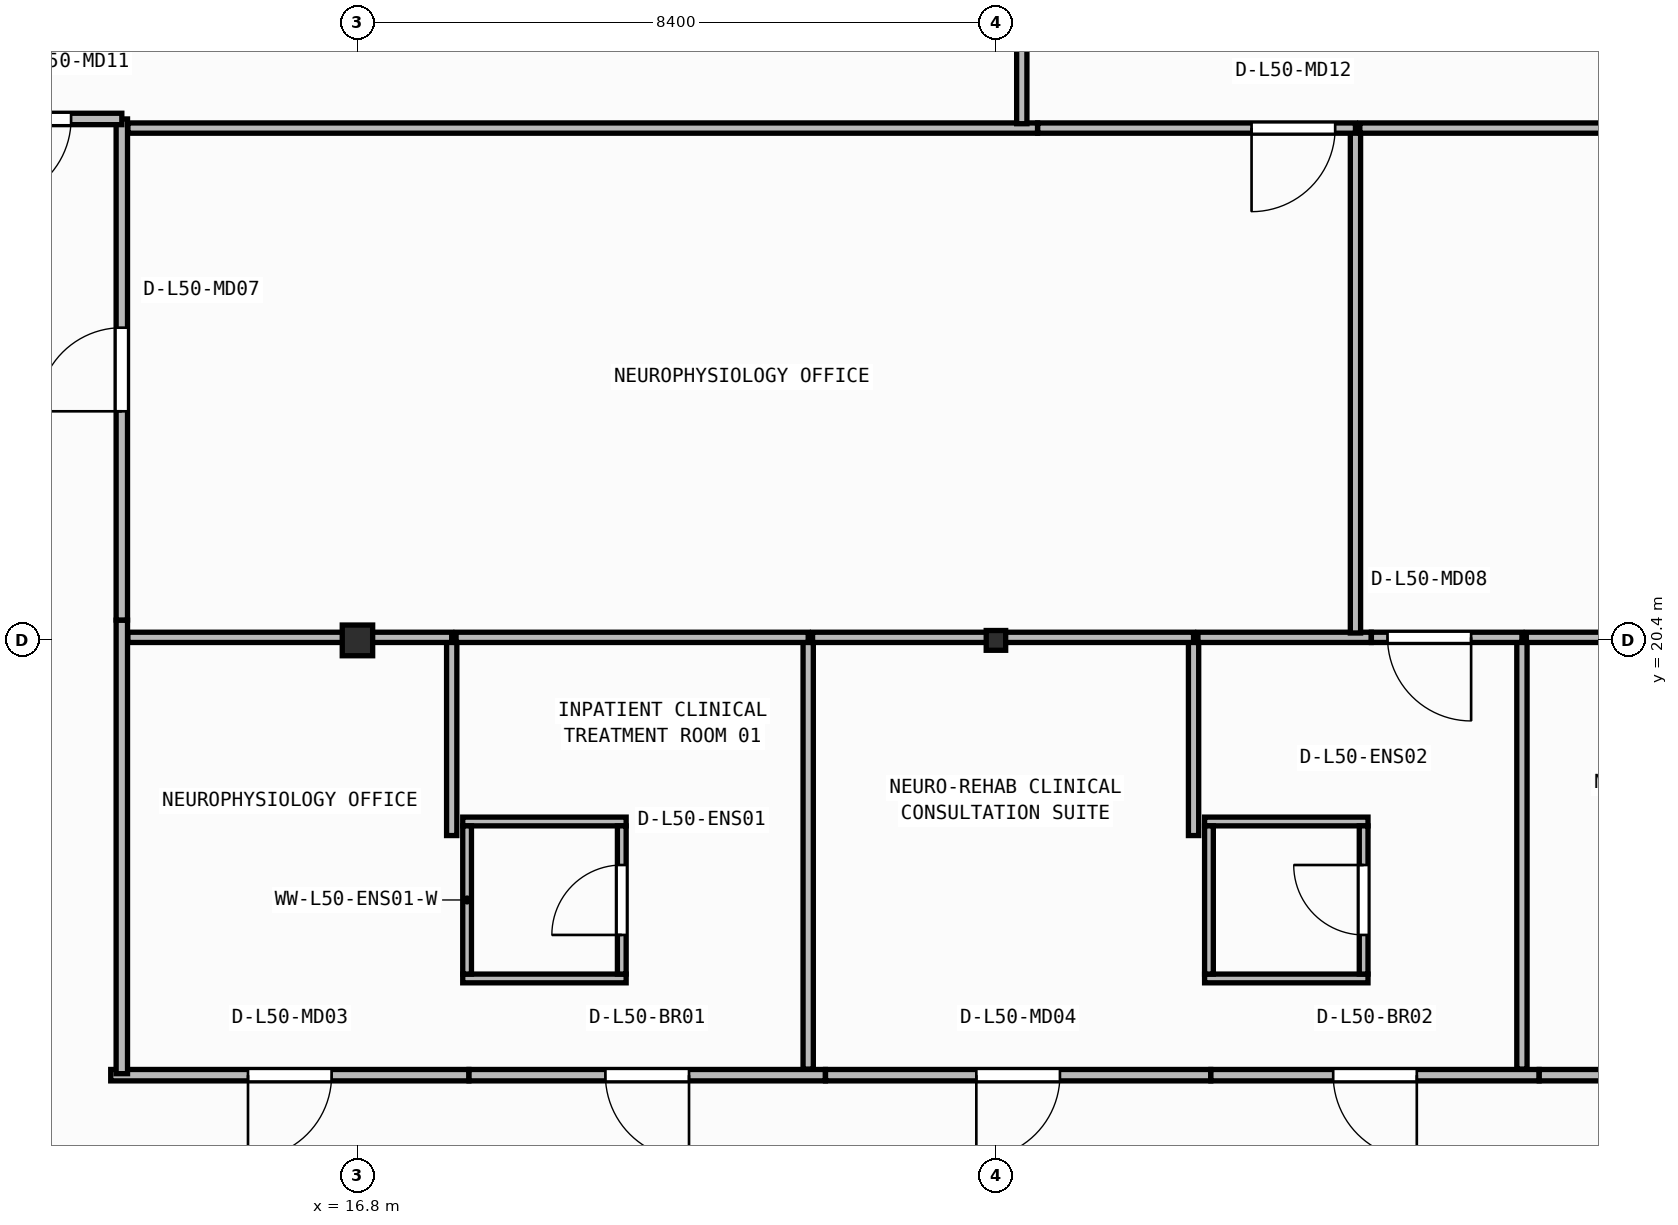
"""IFC4 building model, lengths in metres.
Left out: names, types, materials, properties, quantities, classifications, styles, units other than length and angle.
Written with IfcOpenShell. Run it as: python <this file> out.ifc"""

import sys

from ifc_helpers import new_model, si_unit, direction, frame, frame_2d, origin, origin_2d, place, context, subcontext, project, spatial, rectangle, i_section, extrude, element, fill, save


model = new_model("IFC4")
c1 = context("Model", 3, precision=1e-05, world=origin(), true_north=direction((0.0, 1.0)))
c2 = subcontext(c1, "Body", "Model", "MODEL_VIEW")
j1 = project(units=[si_unit("LENGTHUNIT", "METRE"), si_unit("PLANEANGLEUNIT", "RADIAN")], contexts=[c1])
p1 = place(None, origin())
s1 = spatial("IfcSite", under=j1, at=p1, CompositionType="ELEMENT")
p2 = place(p1, origin())
s2 = spatial("IfcBuilding", under=s1, at=p2, CompositionType="ELEMENT")
p3 = place(p2, frame((0.0, 0.0, 203.95)))
s3 = spatial("IfcBuildingStorey", under=s2, at=p3, CompositionType="ELEMENT", Elevation=203.95)
p4 = place(p3, frame((16.8, 20.4, 0.0), z_axis=(0.0, 0.0, 1.0), x_axis=(1.0, 0.0, 0.0)))
e1 = element("IfcColumn", 1, at=p4, inside=s3, PredefinedType="COLUMN", context=c2, shape_type="SweptSolid", body=[
    extrude(i_section(OverallWidth=0.4, OverallDepth=0.404, WebThickness=0.02, FlangeThickness=0.032, at=origin_2d()), origin(), (0.0, 0.0, 1.0), 3.95),
])
p5 = place(p3, frame((25.2, 20.4, 0.0), z_axis=(0.0, 0.0, 1.0), x_axis=(1.0, 0.0, 0.0)))
e2 = element("IfcColumn", 2, at=p5, inside=s3, PredefinedType="COLUMN", context=c2, shape_type="SweptSolid", body=[
    extrude(i_section(OverallWidth=0.256, OverallDepth=0.26, WebThickness=0.01, FlangeThickness=0.017, FilletRadius=0.013, at=origin_2d()), origin(), (0.0, 0.0, 1.0), 3.95),
])
for number, where, z_axis, x_axis in (
    (3, (18.185, 15.952, 0.0), (0.0, 0.0, 1.0), (1.0, 0.0, 0.0)),
    (4, (18.185, 18.018, 0.0), (0.0, 0.0, 1.0), (1.0, 0.0, 0.0)),
):
    element("IfcWall", number, at=place(p3, frame(where, z_axis=z_axis, x_axis=x_axis)), inside=s3, PredefinedType="PARTITIONING", context=c2, shape_type="SweptSolid", body=[
        extrude(rectangle(XDim=2.15, YDim=0.115, at=frame_2d((1.075, 0.0))), origin(), (0.0, 0.0, 1.0), 3.71),
    ])
p6 = place(p3, frame((18.242, 16.01, 0.0), z_axis=(0.0, 0.0, 1.0), x_axis=(0.0, 1.0, 0.0)))
e5 = element("IfcWall", 5, at=p6, inside=s3, PredefinedType="PARTITIONING", context=c2, shape_type="SweptSolid", body=[
    extrude(rectangle(XDim=1.95, YDim=0.115, at=frame_2d((0.975, 0.0))), origin(), (0.0, 0.0, 1.0), 3.71),
])
p7 = place(p3, frame((20.278, 16.01, 0.0), z_axis=(0.0, 0.0, 1.0), x_axis=(0.0, 1.0, 0.0)))
e6 = element("IfcWall", 6, at=p7, inside=s3, PredefinedType="PARTITIONING", context=c2, shape_type="SweptSolid", body=[
    extrude(rectangle(XDim=1.95, YDim=0.115, at=frame_2d((0.975, 0.0))), origin(), (0.0, 0.0, 1.0), 3.71),
])
p8 = place(p7, frame((0.515, 0.0, 0.0)))
e7 = element("IfcOpeningElement", 7, at=p8, cuts=e6, PredefinedType="OPENING", context=c2, shape_type="SweptSolid", body=[
    extrude(rectangle(XDim=0.92, YDim=2.1, at=frame_2d((0.46, 1.05))), frame((0.0, 0.067, 0.0), z_axis=(0.0, -1.0, 0.0), x_axis=(1.0, 0.0, 0.0)), (0.0, 0.0, 1.0), 0.135),
])
p9 = place(p3, frame((27.945, 15.952, 0.0), z_axis=(0.0, 0.0, 1.0), x_axis=(1.0, 0.0, 0.0)))
e8 = element("IfcWall", 8, at=p9, inside=s3, PredefinedType="PARTITIONING", context=c2, shape_type="SweptSolid", body=[
    extrude(rectangle(XDim=2.15, YDim=0.115, at=frame_2d((1.075, 0.0))), origin(), (0.0, 0.0, 1.0), 3.381),
])
p10 = place(p3, frame((27.945, 18.018, 0.0), z_axis=(0.0, 0.0, 1.0), x_axis=(1.0, 0.0, 0.0)))
e9 = element("IfcWall", 9, at=p10, inside=s3, PredefinedType="PARTITIONING", context=c2, shape_type="SweptSolid", body=[
    extrude(rectangle(XDim=2.15, YDim=0.115, at=frame_2d((1.075, 0.0))), origin(), (0.0, 0.0, 1.0), 3.71),
])
p11 = place(p3, frame((28.002, 16.01, 0.0), z_axis=(0.0, 0.0, 1.0), x_axis=(0.0, 1.0, 0.0)))
e10 = element("IfcWall", 10, at=p11, inside=s3, PredefinedType="PARTITIONING", context=c2, shape_type="SweptSolid", body=[
    extrude(rectangle(XDim=1.95, YDim=0.115, at=frame_2d((0.975, 0.0))), origin(), (0.0, 0.0, 1.0), 3.71),
])
p12 = place(p3, frame((30.038, 16.01, 0.0), z_axis=(0.0, 0.0, 1.0), x_axis=(0.0, 1.0, 0.0)))
e11 = element("IfcWall", 11, at=p12, inside=s3, PredefinedType="PARTITIONING", context=c2, shape_type="SweptSolid", body=[
    extrude(rectangle(XDim=1.95, YDim=0.115, at=frame_2d((0.975, 0.0))), origin(), (0.0, 0.0, 1.0), 3.71),
])
p13 = place(p12, frame((0.515, 0.0, 0.0)))
e12 = element("IfcOpeningElement", 12, at=p13, cuts=e11, PredefinedType="OPENING", context=c2, shape_type="SweptSolid", body=[
    extrude(rectangle(XDim=0.92, YDim=2.1, at=frame_2d((0.46, 1.05))), frame((0.0, 0.067, 0.0), z_axis=(0.0, -1.0, 0.0), x_axis=(1.0, 0.0, 0.0)), (0.0, 0.0, 1.0), 0.135),
])
p14 = place(p3, frame((18.266, 14.68, 0.0), z_axis=(0.0, 0.0, 1.0), x_axis=(-1.0, 0.0, 0.0)))
e13 = element("IfcWall", 13, at=p14, inside=s3, PredefinedType="PARTITIONING", context=c2, shape_type="SweptSolid", body=[
    extrude(rectangle(XDim=4.712, YDim=0.15, at=frame_2d((2.356, 0.0))), origin(), (0.0, 0.0, 1.0), 3.71),
])
p15 = place(p14, frame((1.806, 0.0, 0.0)))
e14 = element("IfcOpeningElement", 14, at=p15, cuts=e13, PredefinedType="OPENING", context=c2, shape_type="SweptSolid", body=[
    extrude(rectangle(XDim=1.1, YDim=2.1, at=frame_2d((0.55, 1.05))), frame((0.0, 0.085, 0.0), z_axis=(0.0, -1.0, 0.0), x_axis=(1.0, 0.0, 0.0)), (0.0, 0.0, 1.0), 0.17),
])
p16 = place(p3, frame((22.956, 14.68, 0.0), z_axis=(0.0, 0.0, 1.0), x_axis=(-1.0, 0.0, 0.0)))
e15 = element("IfcWall", 15, at=p16, inside=s3, PredefinedType="PARTITIONING", context=c2, shape_type="SweptSolid", body=[
    extrude(rectangle(XDim=4.688, YDim=0.15, at=frame_2d((2.344, 0.0))), origin(), (0.0, 0.0, 1.0), 3.71),
])
p17 = place(p16, frame((1.794, 0.0, 0.0)))
e16 = element("IfcOpeningElement", 16, at=p17, cuts=e15, PredefinedType="OPENING", context=c2, shape_type="SweptSolid", body=[
    extrude(rectangle(XDim=1.1, YDim=2.1, at=frame_2d((0.55, 1.05))), frame((0.0, 0.085, 0.0), z_axis=(0.0, -1.0, 0.0), x_axis=(1.0, 0.0, 0.0)), (0.0, 0.0, 1.0), 0.17),
])
p18 = place(p3, frame((28.026, 14.68, 0.0), z_axis=(0.0, 0.0, 1.0), x_axis=(-1.0, 0.0, 0.0)))
e17 = element("IfcWall", 17, at=p18, inside=s3, PredefinedType="PARTITIONING", context=c2, shape_type="SweptSolid", body=[
    extrude(rectangle(XDim=5.068, YDim=0.15, at=frame_2d((2.534, 0.0))), origin(), (0.0, 0.0, 1.0), 3.71),
])
p19 = place(p18, frame((1.984, 0.0, 0.0)))
e18 = element("IfcOpeningElement", 18, at=p19, cuts=e17, PredefinedType="OPENING", context=c2, shape_type="SweptSolid", body=[
    extrude(rectangle(XDim=1.1, YDim=2.1, at=frame_2d((0.55, 1.05))), frame((0.0, 0.085, 0.0), z_axis=(0.0, -1.0, 0.0), x_axis=(1.0, 0.0, 0.0)), (0.0, 0.0, 1.0), 0.17),
])
p20 = place(p3, frame((32.346, 14.68, 0.0), z_axis=(0.0, 0.0, 1.0), x_axis=(-1.0, 0.0, 0.0)))
e19 = element("IfcWall", 19, at=p20, inside=s3, PredefinedType="PARTITIONING", context=c2, shape_type="SweptSolid", body=[
    extrude(rectangle(XDim=4.318, YDim=0.15, at=frame_2d((2.159, 0.0))), origin(), (0.0, 0.0, 1.0), 3.71),
])
p21 = place(p20, frame((1.609, 0.0, 0.0)))
e20 = element("IfcOpeningElement", 20, at=p21, cuts=e19, PredefinedType="OPENING", context=c2, shape_type="SweptSolid", body=[
    extrude(rectangle(XDim=1.1, YDim=2.1, at=frame_2d((0.55, 1.05))), frame((0.0, 0.085, 0.0), z_axis=(0.0, -1.0, 0.0), x_axis=(1.0, 0.0, 0.0)), (0.0, 0.0, 1.0), 0.17),
])
p22 = place(p3, frame((37.036, 14.68, 0.0), z_axis=(0.0, 0.0, 1.0), x_axis=(-1.0, 0.0, 0.0)))
e21 = element("IfcWall", 21, at=p22, inside=s3, PredefinedType="PARTITIONING", context=c2, shape_type="SweptSolid", body=[
    extrude(rectangle(XDim=4.688, YDim=0.15, at=frame_2d((2.344, 0.0))), origin(), (0.0, 0.0, 1.0), 3.71),
])
p23 = place(p22, frame((1.794, 0.0, 0.0)))
e22 = element("IfcOpeningElement", 22, at=p23, cuts=e21, PredefinedType="OPENING", context=c2, shape_type="SweptSolid", body=[
    extrude(rectangle(XDim=1.1, YDim=2.1, at=frame_2d((0.55, 1.05))), frame((0.0, 0.085, 0.0), z_axis=(0.0, -1.0, 0.0), x_axis=(1.0, 0.0, 0.0)), (0.0, 0.0, 1.0), 0.17),
])
p24 = place(p3, frame((13.7, 14.7, 0.0), z_axis=(0.0, 0.0, 1.0), x_axis=(0.0, 1.0, 0.0)))
e23 = element("IfcWall", 23, at=p24, inside=s3, PredefinedType="PARTITIONING", context=c2, shape_type="SweptSolid", body=[
    extrude(rectangle(XDim=5.966, YDim=0.15, at=frame_2d((2.983, 0.0))), origin(), (0.0, 0.0, 1.0), 3.71),
])
p25 = place(p3, frame((13.7, 20.668, 0.0), z_axis=(0.0, 0.0, 1.0), x_axis=(0.0, 1.0, 0.0)))
e24 = element("IfcWall", 24, at=p25, inside=s3, PredefinedType="PARTITIONING", context=c2, shape_type="SweptSolid", body=[
    extrude(rectangle(XDim=6.592, YDim=0.15, at=frame_2d((3.296, 0.0))), origin(), (0.0, 0.0, 1.0), 3.71),
])
p26 = place(p25, frame((2.746, 0.0, 0.0)))
e25 = element("IfcOpeningElement", 25, at=p26, cuts=e24, PredefinedType="OPENING", context=c2, shape_type="SweptSolid", body=[
    extrude(rectangle(XDim=1.1, YDim=2.1, at=frame_2d((0.55, 1.05))), frame((0.0, 0.085, 0.0), z_axis=(0.0, -1.0, 0.0), x_axis=(1.0, 0.0, 0.0)), (0.0, 0.0, 1.0), 0.17),
])
p27 = place(p3, frame((13.7, 27.26, 0.0), z_axis=(0.0, 0.0, 1.0), x_axis=(-1.0, 0.0, 0.0)))
e26 = element("IfcWall", 26, at=p27, inside=s3, PredefinedType="PARTITIONING", context=c2, shape_type="SweptSolid", body=[
    extrude(rectangle(XDim=2.435, YDim=0.15, at=frame_2d((1.218, 0.0))), origin(), (0.0, 0.0, 1.0), 3.71),
])
p28 = place(p27, frame((0.667, 0.0, 0.0)))
e27 = element("IfcOpeningElement", 27, at=p28, cuts=e26, PredefinedType="OPENING", context=c2, shape_type="SweptSolid", body=[
    extrude(rectangle(XDim=1.1, YDim=2.1, at=frame_2d((0.55, 1.05))), frame((0.0, 0.085, 0.0), z_axis=(0.0, -1.0, 0.0), x_axis=(1.0, 0.0, 0.0)), (0.0, 0.0, 1.0), 0.17),
])
p29 = place(p3, frame((18.04, 17.833, 0.0), z_axis=(0.0, 0.0, 1.0), x_axis=(0.0, 1.0, 0.0)))
e28 = element("IfcWall", 28, at=p29, inside=s3, PredefinedType="PARTITIONING", context=c2, shape_type="SweptSolid", body=[
    extrude(rectangle(XDim=2.607, YDim=0.135, at=frame_2d((1.304, 0.0))), origin(), (0.0, 0.0, 1.0), 3.71),
])
p30 = place(p3, frame((18.04, 20.44, 0.0), z_axis=(0.0, 0.0, 1.0), x_axis=(-1.0, 0.0, 0.0)))
e29 = element("IfcWall", 29, at=p30, inside=s3, PredefinedType="PARTITIONING", context=c2, shape_type="SweptSolid", body=[
    extrude(rectangle(XDim=4.26, YDim=0.135, at=frame_2d((2.13, 0.0))), origin(), (0.0, 0.0, 1.0), 3.152),
])
p31 = place(p3, frame((22.73, 14.76, 0.0), z_axis=(0.0, 0.0, 1.0), x_axis=(0.0, 1.0, 0.0)))
e30 = element("IfcWall", 30, at=p31, inside=s3, PredefinedType="PARTITIONING", context=c2, shape_type="SweptSolid", body=[
    extrude(rectangle(XDim=5.68, YDim=0.135, at=frame_2d((2.84, 0.0))), origin(), (0.0, 0.0, 1.0), 3.71),
])
p32 = place(p3, frame((22.73, 20.44, 0.0), z_axis=(0.0, 0.0, 1.0), x_axis=(-1.0, 0.0, 0.0)))
e31 = element("IfcWall", 31, at=p32, inside=s3, PredefinedType="PARTITIONING", context=c2, shape_type="SweptSolid", body=[
    extrude(rectangle(XDim=4.633, YDim=0.135, at=frame_2d((2.316, 0.0))), origin(), (0.0, 0.0, 1.0), 3.152),
])
p33 = place(p3, frame((27.8, 17.833, 0.0), z_axis=(0.0, 0.0, 1.0), x_axis=(0.0, 1.0, 0.0)))
e32 = element("IfcWall", 32, at=p33, inside=s3, PredefinedType="PARTITIONING", context=c2, shape_type="SweptSolid", body=[
    extrude(rectangle(XDim=2.607, YDim=0.135, at=frame_2d((1.304, 0.0))), origin(), (0.0, 0.0, 1.0), 3.71),
])
p34 = place(p3, frame((27.8, 20.44, 0.0), z_axis=(0.0, 0.0, 1.0), x_axis=(-1.0, 0.0, 0.0)))
e33 = element("IfcWall", 33, at=p34, inside=s3, PredefinedType="PARTITIONING", context=c2, shape_type="SweptSolid", body=[
    extrude(rectangle(XDim=5.012, YDim=0.135, at=frame_2d((2.506, 0.0))), origin(), (0.0, 0.0, 1.0), 3.152),
])
p35 = place(p3, frame((32.12, 14.76, 0.0), z_axis=(0.0, 0.0, 1.0), x_axis=(0.0, 1.0, 0.0)))
e34 = element("IfcWall", 34, at=p35, inside=s3, PredefinedType="PARTITIONING", context=c2, shape_type="SweptSolid", body=[
    extrude(rectangle(XDim=5.68, YDim=0.135, at=frame_2d((2.84, 0.0))), origin(), (0.0, 0.0, 1.0), 3.71),
])
p36 = place(p3, frame((30.137, 20.44, 0.0), z_axis=(0.0, 0.0, 1.0), x_axis=(-1.0, 0.0, 0.0)))
e35 = element("IfcWall", 35, at=p36, inside=s3, PredefinedType="PARTITIONING", context=c2, shape_type="SweptSolid", body=[
    extrude(rectangle(XDim=2.28, YDim=0.135, at=frame_2d((1.14, 0.0))), origin(), (0.0, 0.0, 1.0), 3.152),
])
p37 = place(p3, frame((32.12, 20.44, 0.0), z_axis=(0.0, 0.0, 1.0), x_axis=(-1.0, 0.0, 0.0)))
e36 = element("IfcWall", 36, at=p37, inside=s3, PredefinedType="PARTITIONING", context=c2, shape_type="SweptSolid", body=[
    extrude(rectangle(XDim=1.981, YDim=0.135, at=frame_2d((0.99, 0.0))), origin(), (0.0, 0.0, 1.0), 3.152),
])
p38 = place(p37, frame((0.668, 0.0, 0.0)))
e37 = element("IfcOpeningElement", 37, at=p38, cuts=e36, PredefinedType="OPENING", context=c2, shape_type="SweptSolid", body=[
    extrude(rectangle(XDim=1.1, YDim=2.1, at=frame_2d((0.55, 1.05))), frame((0.0, 0.077, 0.0), z_axis=(0.0, -1.0, 0.0), x_axis=(1.0, 0.0, 0.0)), (0.0, 0.0, 1.0), 0.155),
])
p39 = place(p3, frame((36.81, 20.44, 0.0), z_axis=(0.0, 0.0, 1.0), x_axis=(-1.0, 0.0, 0.0)))
e38 = element("IfcWall", 38, at=p39, inside=s3, PredefinedType="PARTITIONING", context=c2, shape_type="SweptSolid", body=[
    extrude(rectangle(XDim=4.633, YDim=0.135, at=frame_2d((2.316, 0.0))), origin(), (0.0, 0.0, 1.0), 3.152),
])
p40 = place(p3, frame((29.93, 20.498, 0.0), z_axis=(0.0, 0.0, 1.0), x_axis=(0.0, 1.0, 0.0)))
e39 = element("IfcWall", 39, at=p40, inside=s3, PredefinedType="PARTITIONING", context=c2, shape_type="SweptSolid", body=[
    extrude(rectangle(XDim=6.642, YDim=0.135, at=frame_2d((3.321, 0.0))), origin(), (0.0, 0.0, 1.0), 3.71),
])
p41 = place(p3, frame((25.748, 27.14, 0.0), z_axis=(0.0, 0.0, 1.0), x_axis=(-1.0, 0.0, 0.0)))
e40 = element("IfcWall", 40, at=p41, inside=s3, PredefinedType="PARTITIONING", context=c2, shape_type="SweptSolid", body=[
    extrude(rectangle(XDim=11.968, YDim=0.135, at=frame_2d((5.984, 0.0))), origin(), (0.0, 0.0, 1.0), 3.71),
])
p42 = place(p3, frame((29.93, 27.14, 0.0), z_axis=(0.0, 0.0, 1.0), x_axis=(-1.0, 0.0, 0.0)))
e41 = element("IfcWall", 41, at=p42, inside=s3, PredefinedType="PARTITIONING", context=c2, shape_type="SweptSolid", body=[
    extrude(rectangle(XDim=4.18, YDim=0.135, at=frame_2d((2.09, 0.0))), origin(), (0.0, 0.0, 1.0), 3.71),
])
p43 = place(p42, frame((0.267, 0.0, 0.0)))
e42 = element("IfcOpeningElement", 42, at=p43, cuts=e41, PredefinedType="OPENING", context=c2, shape_type="SweptSolid", body=[
    extrude(rectangle(XDim=1.1, YDim=2.1, at=frame_2d((0.55, 1.05))), frame((0.0, 0.077, 0.0), z_axis=(0.0, -1.0, 0.0), x_axis=(1.0, 0.0, 0.0)), (0.0, 0.0, 1.0), 0.155),
])
p44 = place(p3, frame((39.07, 27.14, 0.0), z_axis=(0.0, 0.0, 1.0), x_axis=(-1.0, 0.0, 0.0)))
e43 = element("IfcWall", 43, at=p44, inside=s3, PredefinedType="PARTITIONING", context=c2, shape_type="SweptSolid", body=[
    extrude(rectangle(XDim=9.083, YDim=0.135, at=frame_2d((4.541, 0.0))), origin(), (0.0, 0.0, 1.0), 3.71),
])
p45 = place(p3, frame((25.54, 27.198, 0.0), z_axis=(0.0, 0.0, 1.0), x_axis=(0.0, 1.0, 0.0)))
e44 = element("IfcWall", 44, at=p45, inside=s3, PredefinedType="PARTITIONING", context=c2, shape_type="SweptSolid", body=[
    extrude(rectangle(XDim=4.281, YDim=0.135, at=frame_2d((2.141, 0.0))), origin(), (0.0, 0.0, 1.0), 3.157),
])
p46 = place(p8, origin())
e45 = element("IfcDoor", 45, at=p46, inside=s3, OperationType="SINGLE_SWING_LEFT", PredefinedType="DOOR", context=c2, shape_type="SweptSolid", body=[
    extrude(rectangle(XDim=0.92, YDim=2.1, at=frame_2d((0.46, 1.05))), frame((0.0, 0.025, 0.0), z_axis=(0.0, -1.0, 0.0), x_axis=(1.0, 0.0, 0.0)), (0.0, 0.0, 1.0), 0.05),
])
fill(e7, e45)
p47 = place(p13, origin())
e46 = element("IfcDoor", 46, at=p47, inside=s3, OperationType="SINGLE_SWING_RIGHT", PredefinedType="DOOR", context=c2, shape_type="SweptSolid", body=[
    extrude(rectangle(XDim=0.92, YDim=2.1, at=frame_2d((0.46, 1.05))), frame((0.0, 0.025, 0.0), z_axis=(0.0, -1.0, 0.0), x_axis=(1.0, 0.0, 0.0)), (0.0, 0.0, 1.0), 0.05),
])
fill(e12, e46)
p48 = place(p15, origin())
e47 = element("IfcDoor", 47, at=p48, inside=s3, OperationType="SINGLE_SWING_RIGHT", PredefinedType="DOOR", context=c2, shape_type="SweptSolid", body=[
    extrude(rectangle(XDim=1.1, YDim=2.1, at=frame_2d((0.55, 1.05))), frame((0.0, 0.025, 0.0), z_axis=(0.0, -1.0, 0.0), x_axis=(1.0, 0.0, 0.0)), (0.0, 0.0, 1.0), 0.05),
])
fill(e14, e47)
p49 = place(p17, origin())
e48 = element("IfcDoor", 48, at=p49, inside=s3, OperationType="SINGLE_SWING_LEFT", PredefinedType="DOOR", context=c2, shape_type="SweptSolid", body=[
    extrude(rectangle(XDim=1.1, YDim=2.1, at=frame_2d((0.55, 1.05))), frame((0.0, 0.025, 0.0), z_axis=(0.0, -1.0, 0.0), x_axis=(1.0, 0.0, 0.0)), (0.0, 0.0, 1.0), 0.05),
])
fill(e16, e48)
p50 = place(p19, origin())
e49 = element("IfcDoor", 49, at=p50, inside=s3, OperationType="SINGLE_SWING_RIGHT", PredefinedType="DOOR", context=c2, shape_type="SweptSolid", body=[
    extrude(rectangle(XDim=1.1, YDim=2.1, at=frame_2d((0.55, 1.05))), frame((0.0, 0.025, 0.0), z_axis=(0.0, -1.0, 0.0), x_axis=(1.0, 0.0, 0.0)), (0.0, 0.0, 1.0), 0.05),
])
fill(e18, e49)
p51 = place(p21, origin())
e50 = element("IfcDoor", 50, at=p51, inside=s3, OperationType="SINGLE_SWING_LEFT", PredefinedType="DOOR", context=c2, shape_type="SweptSolid", body=[
    extrude(rectangle(XDim=1.1, YDim=2.1, at=frame_2d((0.55, 1.05))), frame((0.0, 0.025, 0.0), z_axis=(0.0, -1.0, 0.0), x_axis=(1.0, 0.0, 0.0)), (0.0, 0.0, 1.0), 0.05),
])
fill(e20, e50)
p52 = place(p26, origin())
e51 = element("IfcDoor", 51, at=p52, inside=s3, OperationType="SINGLE_SWING_LEFT", PredefinedType="DOOR", context=c2, shape_type="SweptSolid", body=[
    extrude(rectangle(XDim=1.1, YDim=2.1, at=frame_2d((0.55, 1.05))), frame((0.0, 0.025, 0.0), z_axis=(0.0, -1.0, 0.0), x_axis=(1.0, 0.0, 0.0)), (0.0, 0.0, 1.0), 0.05),
])
fill(e25, e51)
p53 = place(p28, origin())
e52 = element("IfcDoor", 52, at=p53, inside=s3, OperationType="SINGLE_SWING_RIGHT", PredefinedType="DOOR", context=c2, shape_type="SweptSolid", body=[
    extrude(rectangle(XDim=1.1, YDim=2.1, at=frame_2d((0.55, 1.05))), frame((0.0, 0.025, 0.0), z_axis=(0.0, -1.0, 0.0), x_axis=(1.0, 0.0, 0.0)), (0.0, 0.0, 1.0), 0.05),
])
fill(e27, e52)
p54 = place(p38, origin())
e53 = element("IfcDoor", 53, at=p54, inside=s3, OperationType="SINGLE_SWING_LEFT", PredefinedType="DOOR", context=c2, shape_type="SweptSolid", body=[
    extrude(rectangle(XDim=1.1, YDim=2.1, at=frame_2d((0.55, 1.05))), frame((0.0, 0.025, 0.0), z_axis=(0.0, -1.0, 0.0), x_axis=(1.0, 0.0, 0.0)), (0.0, 0.0, 1.0), 0.05),
])
fill(e37, e53)
p55 = place(p43, origin())
e54 = element("IfcDoor", 54, at=p55, inside=s3, OperationType="SINGLE_SWING_RIGHT", PredefinedType="DOOR", context=c2, shape_type="SweptSolid", body=[
    extrude(rectangle(XDim=1.1, YDim=2.1, at=frame_2d((0.55, 1.05))), frame((0.0, 0.025, 0.0), z_axis=(0.0, -1.0, 0.0), x_axis=(1.0, 0.0, 0.0)), (0.0, 0.0, 1.0), 0.05),
])
fill(e42, e54)
save(model, sys.argv[1])
